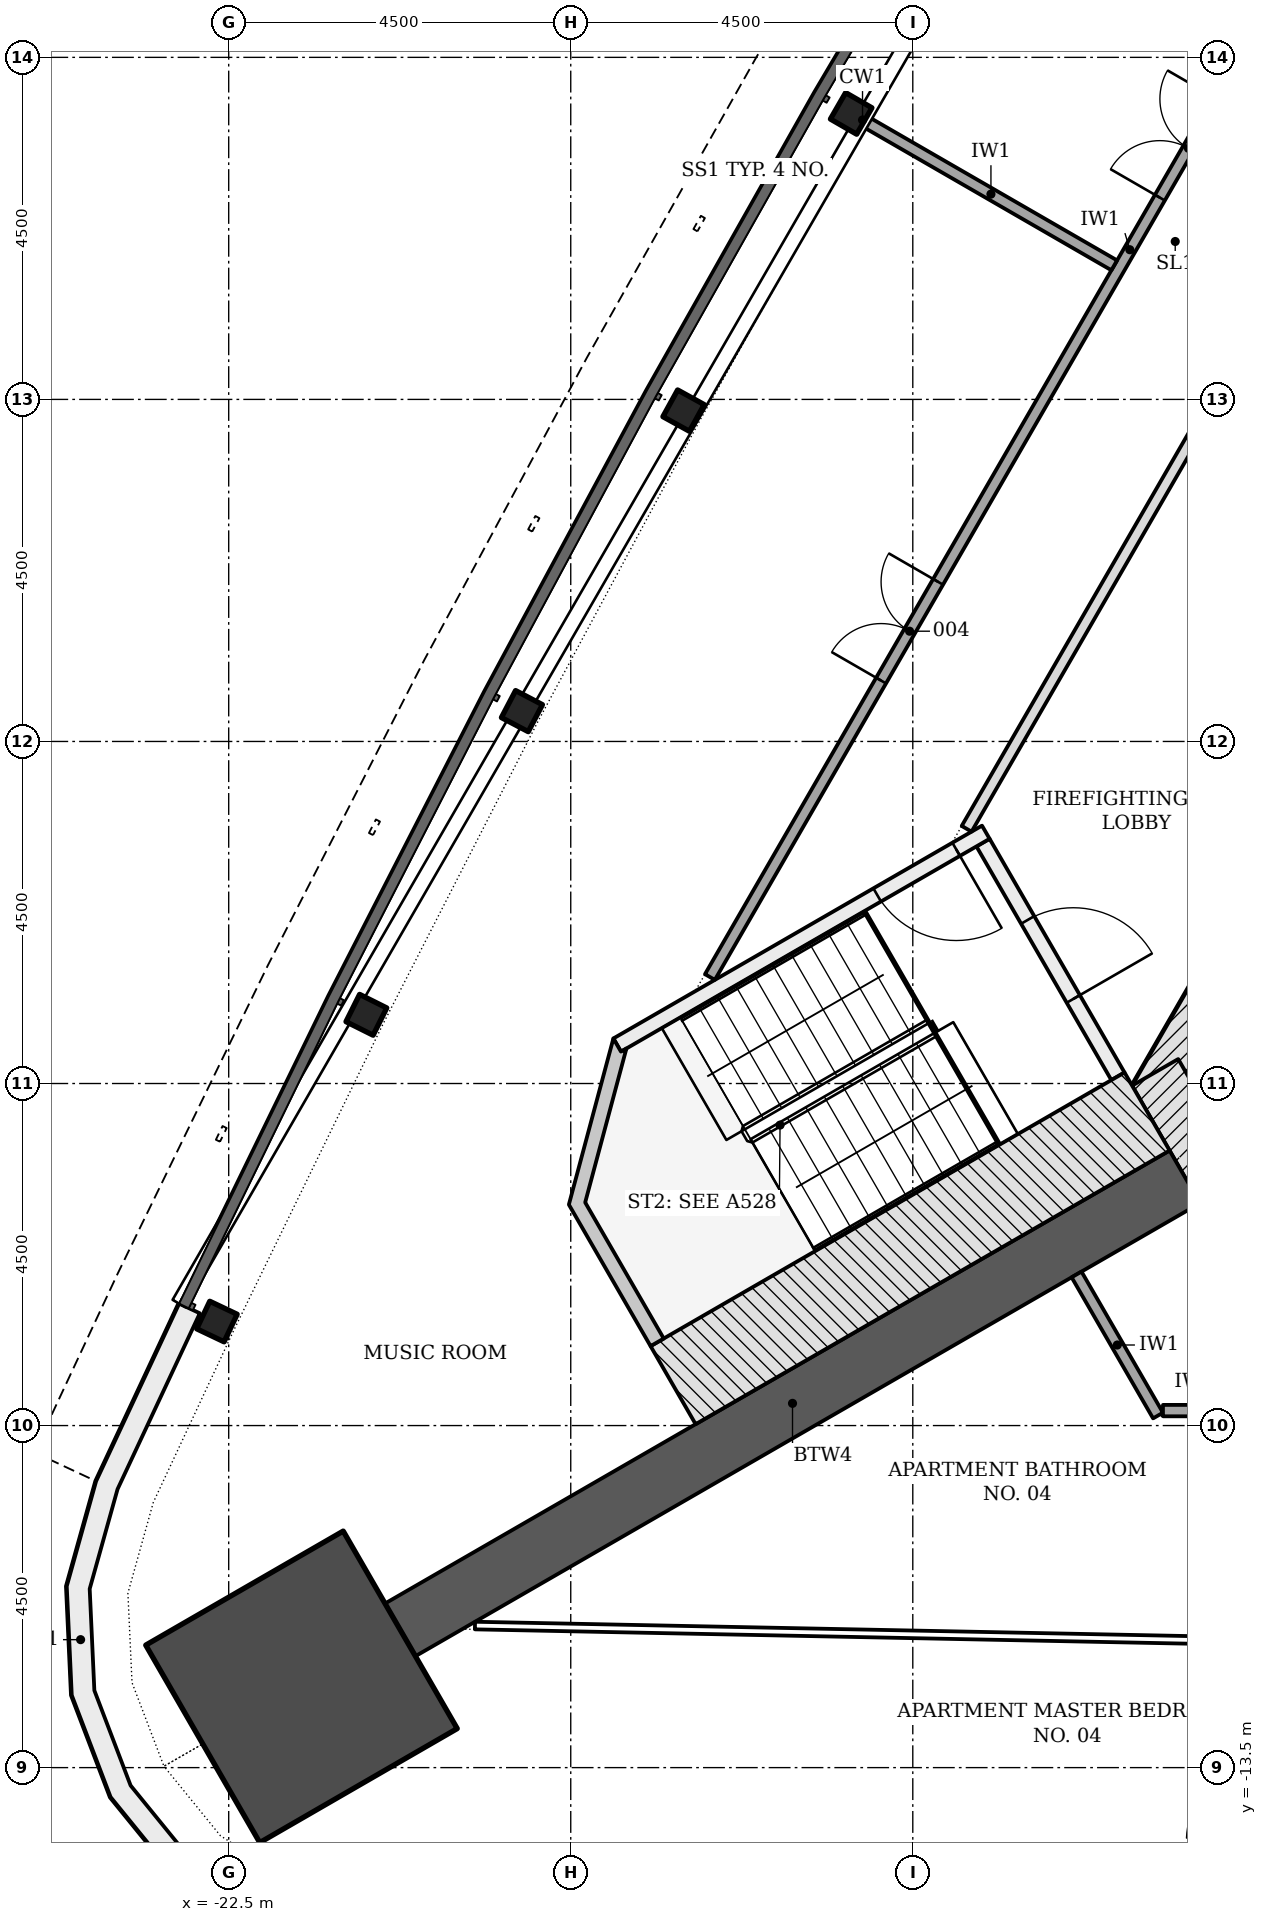
"""IFC4 building model, lengths in metres.
Left out: names, types, materials, properties, quantities, classifications, styles, units other than length and angle.
Written with IfcOpenShell. Run it as: python <this file> out.ifc"""

import sys

from ifc_helpers import new_model, si_unit, direction, frame, frame_2d, origin, origin_2d, place, context, subcontext, project, spatial, polyline, rectangle, i_section, outline, extrude, element, fill, save


model = new_model("IFC4")
c1 = context("Model", 3, precision=1e-05, world=origin(), true_north=direction((0.0, 1.0)))
c2 = subcontext(c1, "Body", "Model", "MODEL_VIEW")
j1 = project(units=[si_unit("LENGTHUNIT", "METRE"), si_unit("PLANEANGLEUNIT", "RADIAN")], contexts=[c1])
p1 = place(None, origin())
s1 = spatial("IfcSite", under=j1, at=p1, CompositionType="ELEMENT")
p2 = place(p1, origin())
s2 = spatial("IfcBuilding", under=s1, at=p2, CompositionType="ELEMENT")
p3 = place(p2, frame((0.0, 0.0, 109.5)))
s3 = spatial("IfcBuildingStorey", under=s2, at=p3, CompositionType="ELEMENT", Elevation=109.5)
p4 = place(p3, frame((-1.083, 11.281, -0.2), z_axis=(0.0, 0.0, 1.0), x_axis=(-0.500001446645, -0.866024568562, 0.0)))
e1 = element("IfcWall", 1, at=p4, inside=s3, PredefinedType="SHEAR", context=c2, shape_type="SweptSolid", body=[
    extrude(rectangle(XDim=18.458, YDim=0.7, at=frame_2d((9.229, 0.0))), origin(), (0.0, 0.0, 1.0), 3.6),
])
p5 = place(p4, frame((8.979, 0.0, 0.2)))
e2 = element("IfcOpeningElement", 2, at=p5, cuts=e1, PredefinedType="OPENING", context=c2, shape_type="SweptSolid", body=[
    extrude(rectangle(XDim=1.2, YDim=2.1, at=frame_2d((0.6, 1.05))), frame((0.0, 0.36, 0.0), z_axis=(0.0, -1.0, 0.0), x_axis=(1.0, 0.0, 0.0)), (0.0, 0.0, 1.0), 0.72),
])
p6 = place(p4, frame((11.029, 0.0, 0.2)))
e3 = element("IfcOpeningElement", 3, at=p6, cuts=e1, PredefinedType="OPENING", context=c2, shape_type="SweptSolid", body=[
    extrude(rectangle(XDim=1.2, YDim=2.1, at=frame_2d((0.6, 1.05))), frame((0.0, 0.36, 0.0), z_axis=(0.0, -1.0, 0.0), x_axis=(1.0, 0.0, 0.0)), (0.0, 0.0, 1.0), 0.72),
])
p7 = place(p3, frame((-10.311, -4.353, -0.2), z_axis=(0.0, 0.0, 1.0), x_axis=(0.500042739161, -0.866000726912, 0.0)))
e4 = element("IfcWall", 4, at=p7, inside=s3, PredefinedType="SHEAR", context=c2, shape_type="SweptSolid", body=[
    extrude(rectangle(XDim=2.771, YDim=0.7, at=frame_2d((1.386, 0.0))), origin(), (0.0, 0.0, 1.0), 3.6),
])
p8 = place(p3, frame((-9.922, -5.728, -0.2), z_axis=(0.0, 0.0, 1.0), x_axis=(-0.866027307971, -0.499996701837, 0.0)))
e5 = element("IfcWall", 5, at=p8, inside=s3, PredefinedType="SHEAR", context=c2, shape_type="SweptSolid", body=[
    extrude(rectangle(XDim=11.918, YDim=0.8, at=frame_2d((5.959, 0.0))), origin(), (0.0, 0.0, 1.0), 3.6),
])
p9 = place(p3, frame((-21.542, -12.438, -0.2), z_axis=(0.0, 0.0, 1.0), x_axis=(-0.866025403784, -0.5, 0.0)))
e6 = element("IfcColumn", 6, at=p9, inside=s3, PredefinedType="COLUMN", context=c2, shape_type="SweptSolid", body=[
    extrude(rectangle(XDim=3.0, YDim=3.0, at=origin_2d()), origin(), (0.0, 0.0, 1.0), 3.6),
])
for number, where, z_axis, x_axis in (
    (7, (-14.311, 8.262, -0.2), (0.0, 0.0, 1.0), (-0.5, -0.866, 0.0)),
    (8, (-16.516, 4.353, -0.2), (0.0, 0.0, 1.0), (-0.483, -0.876, 0.0)),
    (9, (-18.642, 0.399, -0.2), (0.0, 0.0, 1.0), (-0.465, -0.885, 0.0)),
    (10, (-20.689, -3.596, -0.2), (0.0, 0.0, 1.0), (-0.447, -0.895, 0.0)),
    (11, (-22.655, -7.632, -0.2), (0.0, 0.0, 1.0), (-0.429, -0.903, 0.0)),
):
    element("IfcColumn", number, at=place(p3, frame(where, z_axis=z_axis, x_axis=x_axis)), inside=s3, PredefinedType="COLUMN", context=c2, shape_type="SweptSolid", body=[
        extrude(i_section(OverallWidth=0.401, OverallDepth=0.399, WebThickness=0.025, FlangeThickness=0.04, FilletRadius=0.015, at=origin_2d()), origin(), (0.0, 0.0, 1.0), 3.6),
    ])
p10 = place(p3, origin())
e12 = element("IfcWall", 12, at=p10, inside=s3, PredefinedType="NOTDEFINED", context=c2, shape_type="SweptSolid", body=[
    extrude(outline(polyline([(-23.152, -7.396), (-24.245, -9.732), (-24.631, -11.114), (-24.565, -12.547), (-24.054, -13.887), (-23.148, -15.0), (-21.94, -15.774), (-20.551, -16.13), (-17.981, -16.352), (-17.955, -16.053), (-20.5, -15.833), (-21.819, -15.495), (-22.946, -14.774), (-23.791, -13.735), (-24.267, -12.485), (-24.329, -11.148), (-23.962, -9.837), (-22.88, -7.523), (-23.152, -7.396)])), origin(), (0.0, 0.0, 1.0), 3.3),
])
p11 = place(p3, frame((-12.576, -1.331, -0.2), z_axis=(0.0, 0.0, 1.0), x_axis=(0.499970499736, -0.8660424351, 0.0)))
e13 = element("IfcWall", 13, at=p11, inside=s3, PredefinedType="SHEAR", context=c2, shape_type="SweptSolid", body=[
    extrude(rectangle(XDim=3.55, YDim=0.2, at=frame_2d((1.775, 0.0))), origin(), (0.0, 0.0, 1.0), 3.6),
])
p12 = place(p11, frame((1.175, 0.0, 0.2)))
e14 = element("IfcOpeningElement", 14, at=p12, cuts=e13, PredefinedType="OPENING", context=c2, shape_type="SweptSolid", body=[
    extrude(rectangle(XDim=1.2, YDim=2.1, at=frame_2d((0.6, 1.05))), frame((0.0, 0.11, 0.0), z_axis=(0.0, -1.0, 0.0), x_axis=(1.0, 0.0, 0.0)), (0.0, 0.0, 1.0), 0.22),
])
p13 = place(p3, frame((-12.539, -1.194, -0.2), z_axis=(0.0, 0.0, 1.0), x_axis=(-0.866045472092, -0.499965239061, 0.0)))
e15 = element("IfcWall", 15, at=p13, inside=s3, PredefinedType="SHEAR", context=c2, shape_type="SweptSolid", body=[
    extrude(rectangle(XDim=5.6, YDim=0.2, at=frame_2d((2.8, 0.0))), origin(), (0.0, 0.0, 1.0), 3.6),
])
p14 = place(p13, frame((0.45, 0.0, 0.2)))
e16 = element("IfcOpeningElement", 16, at=p14, cuts=e15, PredefinedType="OPENING", context=c2, shape_type="SweptSolid", body=[
    extrude(rectangle(XDim=1.2, YDim=2.1, at=frame_2d((0.6, 1.05))), frame((0.0, 0.11, 0.0), z_axis=(0.0, -1.0, 0.0), x_axis=(1.0, 0.0, 0.0)), (0.0, 0.0, 1.0), 0.22),
])
p15 = place(p3, frame((-10.418, -4.868, -0.2), z_axis=(0.0, 0.0, 1.0), x_axis=(-0.866018442252, -0.500012057535, 0.0)))
e17 = element("IfcWall", 17, at=p15, inside=s3, PredefinedType="SHEAR", context=c2, shape_type="SweptSolid", body=[
    extrude(rectangle(XDim=7.2, YDim=1.186, at=frame_2d((3.6, 0.0))), origin(), (0.0, 0.0, 1.0), 3.6),
])
p16 = place(p3, frame((0.0, 0.0, -0.2)))
e18 = element("IfcWall", 18, at=p16, inside=s3, PredefinedType="SHEAR", context=c2, shape_type="SweptSolid", body=[
    extrude(outline(polyline([(-17.439, -3.907), (-18.025, -6.093), (-16.95, -7.955), (-16.777, -7.855), (-17.81, -6.065), (-17.267, -4.039), (-17.339, -4.081), (-17.339, -4.081), (-17.339, -4.081), (-17.339, -4.081), (-17.339, -4.081), (-17.339, -4.081), (-17.339, -4.081), (-17.339, -4.081), (-17.339, -4.081), (-17.339, -4.081), (-17.339, -4.081), (-17.339, -4.081), (-17.339, -4.081), (-17.339, -4.081), (-17.339, -4.081), (-17.339, -4.081), (-17.339, -4.081), (-17.439, -3.907)])), origin(), (0.0, 0.0, 1.0), 3.6),
])
p17 = place(p3, frame((-16.169, -3.099, 0.0), z_axis=(0.0, 0.0, 1.0), x_axis=(0.499999805269, 0.866025516212, 0.0)))
e19 = element("IfcWall", 19, at=p17, inside=s3, PredefinedType="PARTITIONING", context=c2, shape_type="SweptSolid", body=[
    extrude(rectangle(XDim=22.097, YDim=0.15, at=frame_2d((11.049, 0.0))), origin(), (0.0, 0.0, 1.0), 2.847),
])
p18 = place(p17, frame((17.776, 0.0, 0.0)))
e20 = element("IfcOpeningElement", 20, at=p18, cuts=e19, PredefinedType="OPENING", context=c2, shape_type="SweptSolid", body=[
    extrude(rectangle(XDim=1.0, YDim=2.1, at=frame_2d((0.5, 1.05))), frame((0.0, 0.085, 0.0), z_axis=(0.0, -1.0, 0.0), x_axis=(1.0, 0.0, 0.0)), (0.0, 0.0, 1.0), 0.17),
])
p19 = place(p17, frame((15.186, 0.0, 0.0)))
e21 = element("IfcOpeningElement", 21, at=p19, cuts=e19, PredefinedType="OPENING", context=c2, shape_type="SweptSolid", body=[
    extrude(rectangle(XDim=1.0, YDim=2.1, at=frame_2d((0.5, 1.05))), frame((0.0, 0.085, 0.0), z_axis=(0.0, -1.0, 0.0), x_axis=(1.0, 0.0, 0.0)), (0.0, 0.0, 1.0), 0.17),
])
p20 = place(p17, frame((11.84, 0.0, 0.0)))
e22 = element("IfcOpeningElement", 22, at=p20, cuts=e19, PredefinedType="OPENING", context=c2, shape_type="SweptSolid", body=[
    extrude(rectangle(XDim=1.5, YDim=2.1, at=frame_2d((0.75, 1.05))), frame((0.0, 0.085, 0.0), z_axis=(0.0, -1.0, 0.0), x_axis=(1.0, 0.0, 0.0)), (0.0, 0.0, 1.0), 0.17),
])
p21 = place(p17, frame((4.503, 0.0, 0.0)))
e23 = element("IfcOpeningElement", 23, at=p21, cuts=e19, PredefinedType="OPENING", context=c2, shape_type="SweptSolid", body=[
    extrude(rectangle(XDim=1.5, YDim=2.1, at=frame_2d((0.75, 1.05))), frame((0.0, 0.085, 0.0), z_axis=(0.0, -1.0, 0.0), x_axis=(1.0, 0.0, 0.0)), (0.0, 0.0, 1.0), 0.17),
])
p22 = place(p3, frame((-4.407, 13.374, 0.0), z_axis=(0.0, 0.0, 1.0), x_axis=(-0.499997181693, -0.866027030928, 0.0)))
e24 = element("IfcWall", 24, at=p22, inside=s3, PredefinedType="PARTITIONING", context=c2, shape_type="SweptSolid", body=[
    extrude(rectangle(XDim=16.77, YDim=0.15, at=frame_2d((8.385, 0.0))), origin(), (0.0, 0.0, 1.0), 2.847),
])
p23 = place(p22, frame((8.879, 0.0, 0.0)))
e25 = element("IfcOpeningElement", 25, at=p23, cuts=e24, PredefinedType="OPENING", context=c2, shape_type="SweptSolid", body=[
    extrude(rectangle(XDim=1.0, YDim=2.1, at=frame_2d((0.5, 1.05))), frame((0.0, 0.085, 0.0), z_axis=(0.0, -1.0, 0.0), x_axis=(1.0, 0.0, 0.0)), (0.0, 0.0, 1.0), 0.17),
])
p24 = place(p3, frame((-11.345, -7.012, 0.0), z_axis=(0.0, 0.0, 1.0), x_axis=(0.499998569178, -0.866026229868, 0.0)))
e26 = element("IfcWall", 26, at=p24, inside=s3, PredefinedType="PARTITIONING", context=c2, shape_type="SweptSolid", body=[
    extrude(rectangle(XDim=2.143, YDim=0.15, at=frame_2d((1.072, 0.0))), origin(), (0.0, 0.0, 1.0), 3.4),
])
p25 = place(p3, frame((-10.209, -8.803, 0.0), z_axis=(0.0, 0.0, 1.0), x_axis=(1.0, 0.0, 0.0)))
e27 = element("IfcWall", 27, at=p25, inside=s3, PredefinedType="PARTITIONING", context=c2, shape_type="SweptSolid", body=[
    extrude(rectangle(XDim=0.83, YDim=0.15, at=frame_2d((0.415, 0.0))), origin(), (0.0, 0.0, 1.0), 3.4),
])
p26 = place(p3, frame((-14.094, 8.137, 0.0), z_axis=(0.0, 0.0, 1.0), x_axis=(0.866036909293, -0.499980071345, 0.0)))
e28 = element("IfcWall", 28, at=p26, inside=s3, PredefinedType="PARTITIONING", context=c2, shape_type="SweptSolid", body=[
    extrude(rectangle(XDim=3.746, YDim=0.15, at=frame_2d((1.873, 0.0))), origin(), (0.0, 0.0, 1.0), 2.847),
])
p27 = place(p3, frame((-8.885, -11.839, 0.0), z_axis=(0.0, 0.0, 1.0), x_axis=(-0.999798608679, 0.020068434987, 0.0)))
e29 = element("IfcWall", 29, at=p27, inside=s3, PredefinedType="PARTITIONING", context=c2, shape_type="SweptSolid", body=[
    extrude(rectangle(XDim=10.377, YDim=0.1, at=frame_2d((5.188, 0.0))), origin(), (0.0, 0.0, 1.0), 2.847),
])
p28 = place(p12, origin())
e30 = element("IfcDoor", 30, at=p28, inside=s3, OperationType="SINGLE_SWING_RIGHT", PredefinedType="DOOR", context=c2, shape_type="SweptSolid", body=[
    extrude(rectangle(XDim=1.2, YDim=2.1, at=frame_2d((0.6, 1.05))), frame((0.0, 0.025, 0.0), z_axis=(0.0, -1.0, 0.0), x_axis=(1.0, 0.0, 0.0)), (0.0, 0.0, 1.0), 0.05),
])
fill(e14, e30)
p29 = place(p14, origin())
e31 = element("IfcDoor", 31, at=p29, inside=s3, OperationType="SINGLE_SWING_LEFT", PredefinedType="DOOR", context=c2, shape_type="SweptSolid", body=[
    extrude(rectangle(XDim=1.2, YDim=2.1, at=frame_2d((0.6, 1.05))), frame((0.0, 0.025, 0.0), z_axis=(0.0, -1.0, 0.0), x_axis=(1.0, 0.0, 0.0)), (0.0, 0.0, 1.0), 0.05),
])
fill(e16, e31)
p30 = place(p20, origin())
e32 = element("IfcDoor", 32, at=p30, inside=s3, OperationType="DOUBLE_DOOR_SINGLE_SWING", PredefinedType="DOOR", context=c2, shape_type="SweptSolid", body=[
    extrude(rectangle(XDim=1.5, YDim=2.1, at=frame_2d((0.75, 1.05))), frame((0.0, 0.025, 0.0), z_axis=(0.0, -1.0, 0.0), x_axis=(1.0, 0.0, 0.0)), (0.0, 0.0, 1.0), 0.05),
])
fill(e22, e32)
p31 = place(p21, origin())
e33 = element("IfcDoor", 33, at=p31, inside=s3, OperationType="DOUBLE_DOOR_SINGLE_SWING", PredefinedType="DOOR", context=c2, shape_type="SweptSolid", body=[
    extrude(rectangle(XDim=1.5, YDim=2.1, at=frame_2d((0.75, 1.05))), frame((0.0, 0.025, 0.0), z_axis=(0.0, -1.0, 0.0), x_axis=(1.0, 0.0, 0.0)), (0.0, 0.0, 1.0), 0.05),
])
fill(e23, e33)
save(model, sys.argv[1])
